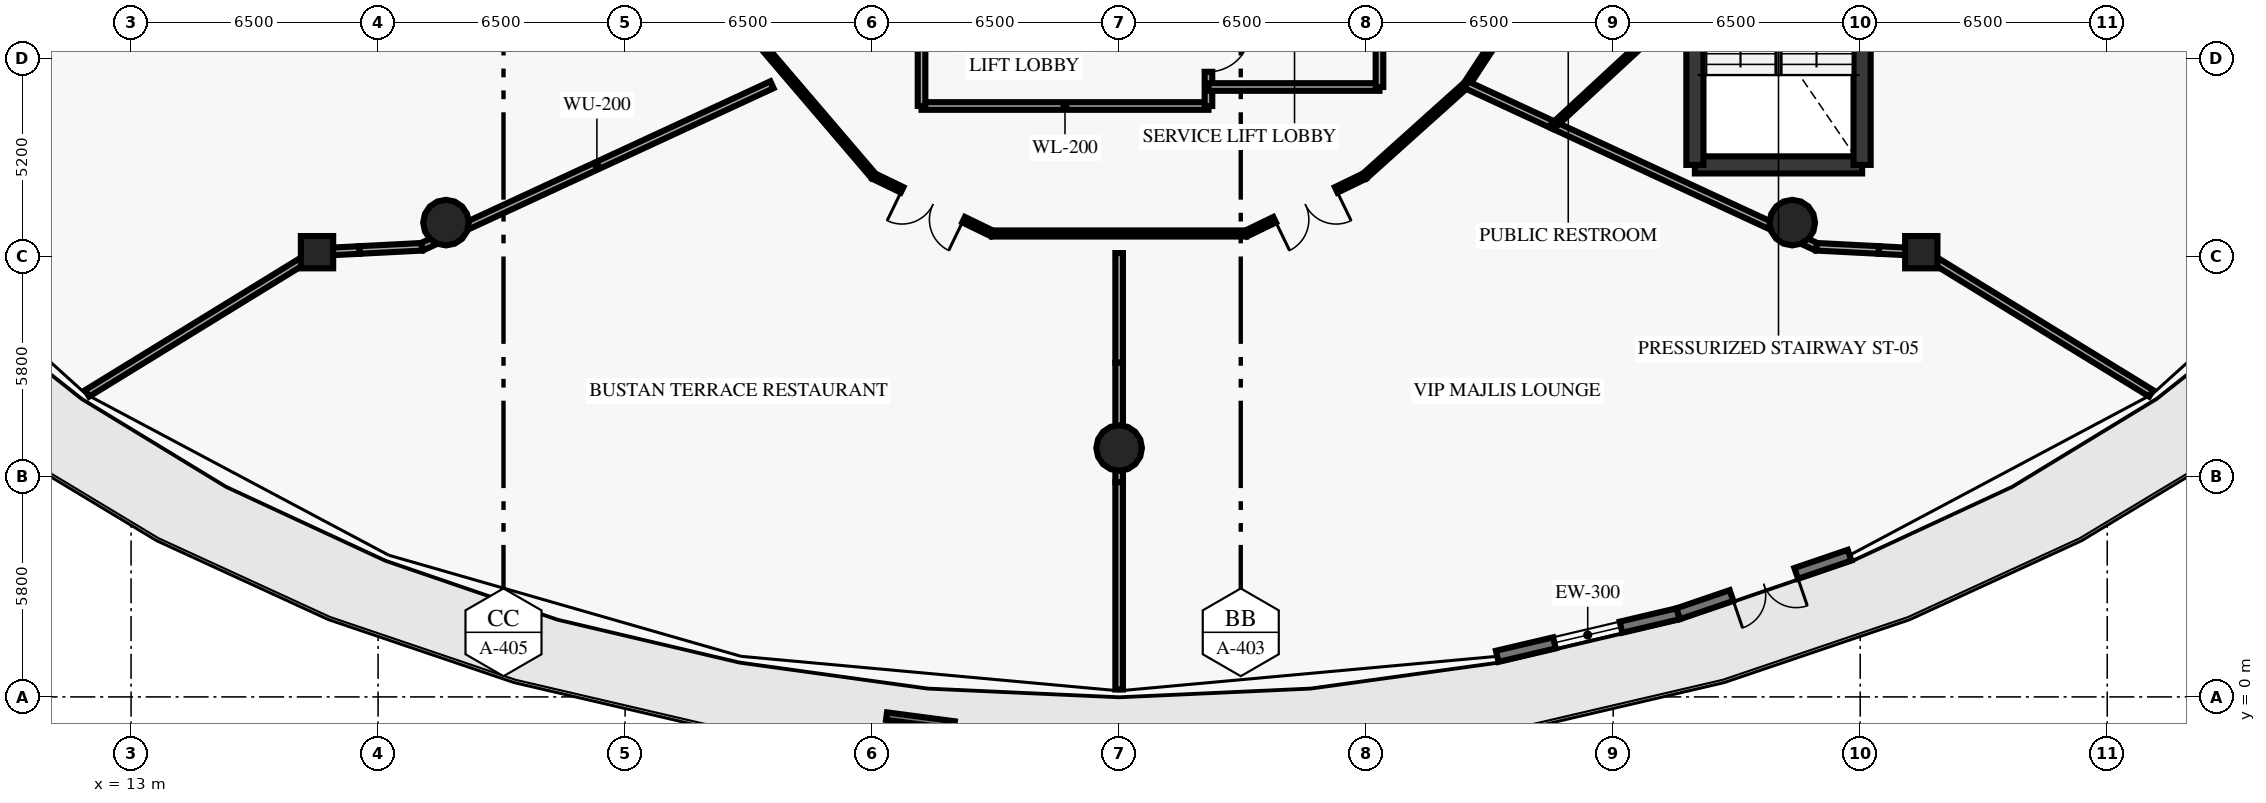
"""IFC4 building model, lengths in metres.
Left out: names, types, materials, properties, quantities, classifications, styles, units other than length and angle.
Written with IfcOpenShell. Run it as: python <this file> out.ifc"""

import sys

from ifc_helpers import new_model, si_unit, direction, frame, frame_2d, origin, origin_2d, place, context, subcontext, project, spatial, rectangle, circle, extrude, element, fill, save


model = new_model("IFC4")
c1 = context("Model", 3, precision=1e-05, world=origin(), true_north=direction((0.0, 1.0)))
c2 = subcontext(c1, "Body", "Model", "MODEL_VIEW")
j1 = project(units=[si_unit("LENGTHUNIT", "METRE"), si_unit("PLANEANGLEUNIT", "RADIAN")], contexts=[c1])
p1 = place(None, origin())
s1 = spatial("IfcSite", under=j1, at=p1, CompositionType="ELEMENT")
p2 = place(p1, origin())
s2 = spatial("IfcBuilding", under=s1, at=p2, CompositionType="ELEMENT")
p3 = place(p2, frame((0.0, 0.0, 6.0)))
s3 = spatial("IfcBuildingStorey", under=s2, at=p3, CompositionType="ELEMENT", Elevation=6.0)
for number, where, z_axis, x_axis in (
    (1, (21.287, 12.481, 0.0), (0.0, 0.0, 1.0), (1.0, 0.0, 0.0)),
    (2, (39.0, 6.55, 0.0), (0.0, 0.0, 1.0), (1.0, 0.0, 0.0)),
    (3, (56.713, 12.481, 0.0), (0.0, 0.0, 1.0), (1.0, 0.0, 0.0)),
):
    element("IfcColumn", number, at=place(p3, frame(where, z_axis=z_axis, x_axis=x_axis)), inside=s3, PredefinedType="COLUMN", context=c2, shape_type="SweptSolid", body=[
        extrude(circle(Radius=0.6, at=origin_2d()), origin(), (0.0, 0.0, 1.0), 4.7),
    ])
for number, where, z_axis, x_axis in (
    (4, (17.893, 11.703, 0.0), (0.0, 0.0, 1.0), (1.0, 0.0, 0.0)),
    (5, (60.107, 11.703, 0.0), (0.0, 0.0, 1.0), (1.0, 0.0, 0.0)),
):
    element("IfcColumn", number, at=place(p3, frame(where, z_axis=z_axis, x_axis=x_axis)), inside=s3, PredefinedType="COLUMN", context=c2, shape_type="SweptSolid", body=[
        extrude(rectangle(XDim=0.85, YDim=0.85, at=origin_2d()), origin(), (0.0, 0.0, 1.0), 4.7),
    ])
p4 = place(p3, frame((53.71, 2.188, 0.0), z_axis=(0.0, 0.0, 1.0), x_axis=(-0.973433532114, -0.228969776514, 0.0)))
e6 = element("IfcWall", 6, at=p4, inside=s3, PredefinedType="STANDARD", context=c2, shape_type="SweptSolid", body=[
    extrude(rectangle(XDim=4.891, YDim=0.3, at=frame_2d((2.445, 0.0))), origin(), (0.0, 0.0, 1.0), 4.7),
])
p5 = place(p4, frame((1.545, 0.0, 0.9)))
e7 = element("IfcOpeningElement", 7, at=p5, cuts=e6, PredefinedType="OPENING", context=c2, shape_type="SweptSolid", body=[
    extrude(rectangle(XDim=1.8, YDim=2.4, at=frame_2d((0.9, 1.2))), frame((0.0, 0.16, 0.0), z_axis=(0.0, -1.0, 0.0), x_axis=(1.0, 0.0, 0.0)), (0.0, 0.0, 1.0), 0.32),
])
p6 = place(p3, frame((58.22, 3.729, 0.0), z_axis=(0.0, 0.0, 1.0), x_axis=(-0.946284884259, -0.323334065362, 0.0)))
e8 = element("IfcWall", 8, at=p6, inside=s3, PredefinedType="STANDARD", context=c2, shape_type="SweptSolid", body=[
    extrude(rectangle(XDim=4.766, YDim=0.3, at=frame_2d((2.383, 0.0))), origin(), (0.0, 0.0, 1.0), 4.7),
])
p7 = place(p6, frame((1.483, 0.0, 0.0)))
e9 = element("IfcOpeningElement", 9, at=p7, cuts=e8, PredefinedType="OPENING", context=c2, shape_type="SweptSolid", body=[
    extrude(rectangle(XDim=1.8, YDim=2.25, at=frame_2d((0.9, 1.125))), frame((0.0, 0.16, 0.0), z_axis=(0.0, -1.0, 0.0), x_axis=(1.0, 0.0, 0.0)), (0.0, 0.0, 1.0), 0.32),
])
p8 = place(p3, frame((34.663, -0.741, 0.0), z_axis=(0.0, 0.0, 1.0), x_axis=(-0.991446905745, 0.130510662743, 0.0)))
e10 = element("IfcWall", 10, at=p8, inside=s3, PredefinedType="ELEMENTEDWALL", context=c2, shape_type="SweptSolid", body=[
    extrude(rectangle(XDim=1.8, YDim=0.2, at=frame_2d((0.9, 0.0))), origin(), (0.0, 0.0, 1.0), 0.65),
])
p9 = place(p3, frame((54.15, 14.0, 0.0), z_axis=(0.0, 0.0, 1.0), x_axis=(1.0, 0.0, 0.0)))
e11 = element("IfcWall", 11, at=p9, inside=s3, PredefinedType="SHEAR", context=c2, shape_type="SweptSolid", body=[
    extrude(rectangle(XDim=4.4, YDim=0.45, at=frame_2d((2.2, 0.0))), origin(), (0.0, 0.0, 1.0), 4.7),
])
for number, where, z_axis, x_axis in (
    (12, (54.15, 14.0, 0.0), (0.0, 0.0, 1.0), (0.0, 1.0, 0.0)),
    (13, (58.55, 14.0, 0.0), (0.0, 0.0, 1.0), (0.0, 1.0, 0.0)),
):
    element("IfcWall", number, at=place(p3, frame(where, z_axis=z_axis, x_axis=x_axis)), inside=s3, PredefinedType="SHEAR", context=c2, shape_type="SweptSolid", body=[
        extrude(rectangle(XDim=7.9, YDim=0.45, at=frame_2d((3.95, 0.0))), origin(), (0.0, 0.0, 1.0), 4.7),
    ])
p10 = place(p3, frame((33.8, 15.55, 0.0), z_axis=(0.0, 0.0, 1.0), x_axis=(1.0, 0.0, 0.0)))
e14 = element("IfcWall", 14, at=p10, inside=s3, PredefinedType="SOLIDWALL", context=c2, shape_type="SweptSolid", body=[
    extrude(rectangle(XDim=7.55, YDim=0.2, at=frame_2d((3.775, 0.0))), origin(), (0.0, 0.0, 1.0), 4.7),
])
p11 = place(p3, frame((33.8, 15.55, 0.0), z_axis=(0.0, 0.0, 1.0), x_axis=(0.0, 1.0, 0.0)))
e15 = element("IfcWall", 15, at=p11, inside=s3, PredefinedType="SOLIDWALL", context=c2, shape_type="SweptSolid", body=[
    extrude(rectangle(XDim=2.8, YDim=0.2, at=frame_2d((1.4, 0.0))), origin(), (0.0, 0.0, 1.0), 4.7),
])
p12 = place(p3, frame((41.35, 15.55, 0.0), z_axis=(0.0, 0.0, 1.0), x_axis=(0.0, 1.0, 0.0)))
e16 = element("IfcWall", 16, at=p12, inside=s3, PredefinedType="SOLIDWALL", context=c2, shape_type="SweptSolid", body=[
    extrude(rectangle(XDim=2.8, YDim=0.2, at=frame_2d((1.4, 0.0))), origin(), (0.0, 0.0, 1.0), 4.7),
])
p13 = place(p12, frame((0.9, 0.0, 0.0)))
e17 = element("IfcOpeningElement", 17, at=p13, cuts=e16, PredefinedType="OPENING", context=c2, shape_type="SweptSolid", body=[
    extrude(rectangle(XDim=1.1, YDim=2.15, at=frame_2d((0.55, 1.075))), frame((0.0, 0.11, 0.0), z_axis=(0.0, -1.0, 0.0), x_axis=(1.0, 0.0, 0.0)), (0.0, 0.0, 1.0), 0.22),
])
p14 = place(p3, frame((41.35, 16.05, 0.0), z_axis=(0.0, 0.0, 1.0), x_axis=(1.0, 0.0, 0.0)))
e18 = element("IfcWall", 18, at=p14, inside=s3, PredefinedType="SOLIDWALL", context=c2, shape_type="SweptSolid", body=[
    extrude(rectangle(XDim=4.5, YDim=0.2, at=frame_2d((2.25, 0.0))), origin(), (0.0, 0.0, 1.0), 4.7),
])
p15 = place(p3, frame((45.85, 16.05, 0.0), z_axis=(0.0, 0.0, 1.0), x_axis=(0.0, 1.0, 0.0)))
e19 = element("IfcWall", 19, at=p15, inside=s3, PredefinedType="SOLIDWALL", context=c2, shape_type="SweptSolid", body=[
    extrude(rectangle(XDim=2.3, YDim=0.2, at=frame_2d((1.15, 0.0))), origin(), (0.0, 0.0, 1.0), 4.7),
])
p16 = place(p3, frame((27.811, 19.24, 0.0), z_axis=(0.0, 0.0, 1.0), x_axis=(0.649652680018, -0.760231145998, 0.0)))
e20 = element("IfcWall", 20, at=p16, inside=s3, PredefinedType="PARTITIONING", context=c2, shape_type="SweptSolid", body=[
    extrude(rectangle(XDim=7.279, YDim=0.16, at=frame_2d((3.64, 0.0))), origin(), (0.0, 0.0, 1.0), 4.7),
])
p17 = place(p3, frame((35.656, 12.195, 0.0), z_axis=(0.0, 0.0, 1.0), x_axis=(-0.899789784655, 0.436323668199, 0.0)))
e21 = element("IfcWall", 21, at=p17, inside=s3, PredefinedType="PARTITIONING", context=c2, shape_type="SweptSolid", body=[
    extrude(rectangle(XDim=3.463, YDim=0.16, at=frame_2d((1.731, 0.0))), origin(), (0.0, 0.0, 1.0), 4.7),
])
p18 = place(p17, frame((0.832, 0.0, 0.0)))
e22 = element("IfcOpeningElement", 22, at=p18, cuts=e21, PredefinedType="OPENING", context=c2, shape_type="SweptSolid", body=[
    extrude(rectangle(XDim=1.8, YDim=2.3, at=frame_2d((0.9, 1.15))), frame((0.0, 0.09, 0.0), z_axis=(0.0, -1.0, 0.0), x_axis=(1.0, 0.0, 0.0)), (0.0, 0.0, 1.0), 0.18),
])
p19 = place(p3, frame((35.656, 12.195, 0.0), z_axis=(0.0, 0.0, 1.0), x_axis=(1.0, 0.0, 0.0)))
e23 = element("IfcWall", 23, at=p19, inside=s3, PredefinedType="PARTITIONING", context=c2, shape_type="SweptSolid", body=[
    extrude(rectangle(XDim=6.688, YDim=0.16, at=frame_2d((3.344, 0.0))), origin(), (0.0, 0.0, 1.0), 4.7),
])
p20 = place(p3, frame((45.46, 13.706, 0.0), z_axis=(0.0, 0.0, 1.0), x_axis=(-0.899789784655, -0.436323668199, 0.0)))
e24 = element("IfcWall", 24, at=p20, inside=s3, PredefinedType="PARTITIONING", context=c2, shape_type="SweptSolid", body=[
    extrude(rectangle(XDim=3.463, YDim=0.16, at=frame_2d((1.731, 0.0))), origin(), (0.0, 0.0, 1.0), 4.7),
])
p21 = place(p20, frame((0.832, 0.0, 0.0)))
e25 = element("IfcOpeningElement", 25, at=p21, cuts=e24, PredefinedType="OPENING", context=c2, shape_type="SweptSolid", body=[
    extrude(rectangle(XDim=1.8, YDim=2.3, at=frame_2d((0.9, 1.15))), frame((0.0, 0.09, 0.0), z_axis=(0.0, -1.0, 0.0), x_axis=(1.0, 0.0, 0.0)), (0.0, 0.0, 1.0), 0.18),
])
p22 = place(p3, frame((45.46, 13.706, 0.0), z_axis=(0.0, 0.0, 1.0), x_axis=(0.744066617248, 0.668105432621, 0.0)))
e26 = element("IfcWall", 26, at=p22, inside=s3, PredefinedType="PARTITIONING", context=c2, shape_type="SweptSolid", body=[
    extrude(rectangle(XDim=3.596, YDim=0.16, at=frame_2d((1.798, 0.0))), origin(), (0.0, 0.0, 1.0), 4.7),
])
p23 = place(p3, frame((50.189, 19.24, 0.0), z_axis=(0.0, 0.0, 1.0), x_axis=(-0.548318837904, -0.836269365694, 0.0)))
e27 = element("IfcWall", 27, at=p23, inside=s3, PredefinedType="PARTITIONING", context=c2, shape_type="SweptSolid", body=[
    extrude(rectangle(XDim=3.744, YDim=0.16, at=frame_2d((1.872, 0.0))), origin(), (0.0, 0.0, 1.0), 4.7),
])
p24 = place(p23, frame((1.447, 0.0, 0.0)))
e28 = element("IfcOpeningElement", 28, at=p24, cuts=e27, PredefinedType="OPENING", context=c2, shape_type="SweptSolid", body=[
    extrude(rectangle(XDim=0.85, YDim=2.1, at=frame_2d((0.425, 1.05))), frame((0.0, 0.09, 0.0), z_axis=(0.0, -1.0, 0.0), x_axis=(1.0, 0.0, 0.0)), (0.0, 0.0, 1.0), 0.18),
])
p25 = place(p3, frame((29.864, 16.109, 0.0), z_axis=(0.0, 0.0, 1.0), x_axis=(-0.907520382507, -0.420008041988, 0.0)))
e29 = element("IfcWall", 29, at=p25, inside=s3, PredefinedType="PARTITIONING", context=c2, shape_type="SweptSolid", body=[
    extrude(rectangle(XDim=10.152, YDim=0.2, at=frame_2d((5.076, 0.0))), origin(), (0.0, 0.0, 1.0), 4.7),
])
p26 = place(p3, frame((20.651, 11.845, 0.0), z_axis=(0.0, 0.0, 1.0), x_axis=(-0.998692725363, -0.051115949639, 0.0)))
e30 = element("IfcWall", 30, at=p26, inside=s3, PredefinedType="PARTITIONING", context=c2, shape_type="SweptSolid", body=[
    extrude(rectangle(XDim=1.643, YDim=0.2, at=frame_2d((0.822, 0.0))), origin(), (0.0, 0.0, 1.0), 4.7),
])
p27 = place(p3, frame((19.01, 11.761, 0.0), z_axis=(0.0, 0.0, 1.0), x_axis=(-0.998649603439, -0.051951607785, 0.0)))
e31 = element("IfcWall", 31, at=p27, inside=s3, PredefinedType="PARTITIONING", context=c2, shape_type="SweptSolid", body=[
    extrude(rectangle(XDim=1.118, YDim=0.2, at=frame_2d((0.559, 0.0))), origin(), (0.0, 0.0, 1.0), 4.24),
])
p28 = place(p3, frame((17.893, 11.703, 0.0), z_axis=(0.0, 0.0, 1.0), x_axis=(-0.852078396496, -0.523414182293, 0.0)))
e32 = element("IfcWall", 32, at=p28, inside=s3, PredefinedType="PARTITIONING", context=c2, shape_type="SweptSolid", body=[
    extrude(rectangle(XDim=7.099, YDim=0.2, at=frame_2d((3.55, 0.0))), origin(), (0.0, 0.0, 1.0), 4.7),
])
p29 = place(p3, frame((39.0, 11.68, 0.0), z_axis=(0.0, 0.0, 1.0), x_axis=(0.0, -1.0, 0.0)))
e33 = element("IfcWall", 33, at=p29, inside=s3, PredefinedType="PARTITIONING", context=c2, shape_type="SweptSolid", body=[
    extrude(rectangle(XDim=2.885, YDim=0.2, at=frame_2d((1.442, 0.0))), origin(), (0.0, 0.0, 1.0), 4.7),
])
p30 = place(p3, frame((39.0, 8.795, 0.0), z_axis=(0.0, 0.0, 1.0), x_axis=(0.0, -1.0, 0.0)))
e34 = element("IfcWall", 34, at=p30, inside=s3, PredefinedType="PARTITIONING", context=c2, shape_type="SweptSolid", body=[
    extrude(rectangle(XDim=2.259, YDim=0.2, at=frame_2d((1.129, 0.0))), origin(), (0.0, 0.0, 1.0), 3.765),
])
p31 = place(p3, frame((39.0, 6.536, 0.0), z_axis=(0.0, 0.0, 1.0), x_axis=(0.0, -1.0, 0.0)))
e35 = element("IfcWall", 35, at=p31, inside=s3, PredefinedType="PARTITIONING", context=c2, shape_type="SweptSolid", body=[
    extrude(rectangle(XDim=0.886, YDim=0.2, at=frame_2d((0.443, 0.0))), origin(), (0.0, 0.0, 1.0), 4.7),
])
p32 = place(p3, frame((39.0, 5.65, 0.0), z_axis=(0.0, 0.0, 1.0), x_axis=(0.0, -1.0, 0.0)))
e36 = element("IfcWall", 36, at=p32, inside=s3, PredefinedType="PARTITIONING", context=c2, shape_type="SweptSolid", body=[
    extrude(rectangle(XDim=5.455, YDim=0.2, at=frame_2d((2.728, 0.0))), origin(), (0.0, 0.0, 1.0), 4.7),
])
p33 = place(p3, frame((48.136, 16.109, 0.0), z_axis=(0.0, 0.0, 1.0), x_axis=(0.907508335547, -0.420034071133, 0.0)))
e37 = element("IfcWall", 37, at=p33, inside=s3, PredefinedType="PARTITIONING", context=c2, shape_type="SweptSolid", body=[
    extrude(rectangle(XDim=2.538, YDim=0.2, at=frame_2d((1.269, 0.0))), origin(), (0.0, 0.0, 1.0), 4.7),
])
p34 = place(p3, frame((50.439, 15.043, 0.0), z_axis=(0.0, 0.0, 1.0), x_axis=(0.907524397356, -0.419999366908, 0.0)))
e38 = element("IfcWall", 38, at=p34, inside=s3, PredefinedType="PARTITIONING", context=c2, shape_type="SweptSolid", body=[
    extrude(rectangle(XDim=7.614, YDim=0.2, at=frame_2d((3.807, 0.0))), origin(), (0.0, 0.0, 1.0), 4.7),
])
p35 = place(p3, frame((57.349, 11.845, 0.0), z_axis=(0.0, 0.0, 1.0), x_axis=(0.998692725363, -0.051115949639, 0.0)))
e39 = element("IfcWall", 39, at=p35, inside=s3, PredefinedType="PARTITIONING", context=c2, shape_type="SweptSolid", body=[
    extrude(rectangle(XDim=1.643, YDim=0.2, at=frame_2d((0.822, 0.0))), origin(), (0.0, 0.0, 1.0), 4.7),
])
p36 = place(p3, frame((58.99, 11.761, 0.0), z_axis=(0.0, 0.0, 1.0), x_axis=(0.998649603439, -0.051951607785, 0.0)))
e40 = element("IfcWall", 40, at=p36, inside=s3, PredefinedType="PARTITIONING", context=c2, shape_type="SweptSolid", body=[
    extrude(rectangle(XDim=1.118, YDim=0.2, at=frame_2d((0.559, 0.0))), origin(), (0.0, 0.0, 1.0), 4.24),
])
p37 = place(p3, frame((60.107, 11.703, 0.0), z_axis=(0.0, 0.0, 1.0), x_axis=(0.852078396496, -0.523414182293, 0.0)))
e41 = element("IfcWall", 41, at=p37, inside=s3, PredefinedType="PARTITIONING", context=c2, shape_type="SweptSolid", body=[
    extrude(rectangle(XDim=7.099, YDim=0.2, at=frame_2d((3.55, 0.0))), origin(), (0.0, 0.0, 1.0), 4.7),
])
p38 = place(p3, frame((50.439, 15.043, 0.0), z_axis=(0.0, 0.0, 1.0), x_axis=(0.734032370371, 0.679114481695, 0.0)))
e42 = element("IfcWall", 42, at=p38, inside=s3, PredefinedType="PARTITIONING", context=c2, shape_type="SweptSolid", body=[
    extrude(rectangle(XDim=3.765, YDim=0.14, at=frame_2d((1.883, 0.0))), origin(), (0.0, 0.0, 1.0), 4.7),
])
p39 = place(p5, origin())
e43 = element("IfcWindow", 43, at=p39, inside=s3, PartitioningType="DOUBLE_PANEL_VERTICAL", PredefinedType="WINDOW", context=c2, shape_type="SweptSolid", body=[
    extrude(rectangle(XDim=1.8, YDim=2.4, at=frame_2d((0.9, 1.2))), frame((0.0, 0.03, 0.0), z_axis=(0.0, -1.0, 0.0), x_axis=(1.0, 0.0, 0.0)), (0.0, 0.0, 1.0), 0.06),
])
fill(e7, e43)
p40 = place(p7, origin())
e44 = element("IfcDoor", 44, at=p40, inside=s3, OperationType="DOUBLE_DOOR_SINGLE_SWING", PredefinedType="DOOR", context=c2, shape_type="SweptSolid", body=[
    extrude(rectangle(XDim=1.8, YDim=2.25, at=frame_2d((0.9, 1.125))), frame((0.0, 0.025, 0.0), z_axis=(0.0, -1.0, 0.0), x_axis=(1.0, 0.0, 0.0)), (0.0, 0.0, 1.0), 0.05),
])
fill(e9, e44)
p41 = place(p13, origin())
e45 = element("IfcDoor", 45, at=p41, inside=s3, OperationType="SINGLE_SWING_RIGHT", PredefinedType="DOOR", context=c2, shape_type="SweptSolid", body=[
    extrude(rectangle(XDim=1.1, YDim=2.15, at=frame_2d((0.55, 1.075))), frame((0.0, 0.025, 0.0), z_axis=(0.0, -1.0, 0.0), x_axis=(1.0, 0.0, 0.0)), (0.0, 0.0, 1.0), 0.05),
])
fill(e17, e45)
p42 = place(p18, origin())
e46 = element("IfcDoor", 46, at=p42, inside=s3, OperationType="DOUBLE_DOOR_SINGLE_SWING", PredefinedType="DOOR", context=c2, shape_type="SweptSolid", body=[
    extrude(rectangle(XDim=1.8, YDim=2.3, at=frame_2d((0.9, 1.15))), frame((0.0, 0.025, 0.0), z_axis=(0.0, -1.0, 0.0), x_axis=(1.0, 0.0, 0.0)), (0.0, 0.0, 1.0), 0.05),
])
fill(e22, e46)
p43 = place(p21, origin())
e47 = element("IfcDoor", 47, at=p43, inside=s3, OperationType="DOUBLE_DOOR_SINGLE_SWING", PredefinedType="DOOR", context=c2, shape_type="SweptSolid", body=[
    extrude(rectangle(XDim=1.8, YDim=2.3, at=frame_2d((0.9, 1.15))), frame((0.0, 0.025, 0.0), z_axis=(0.0, -1.0, 0.0), x_axis=(1.0, 0.0, 0.0)), (0.0, 0.0, 1.0), 0.05),
])
fill(e25, e47)
save(model, sys.argv[1])
